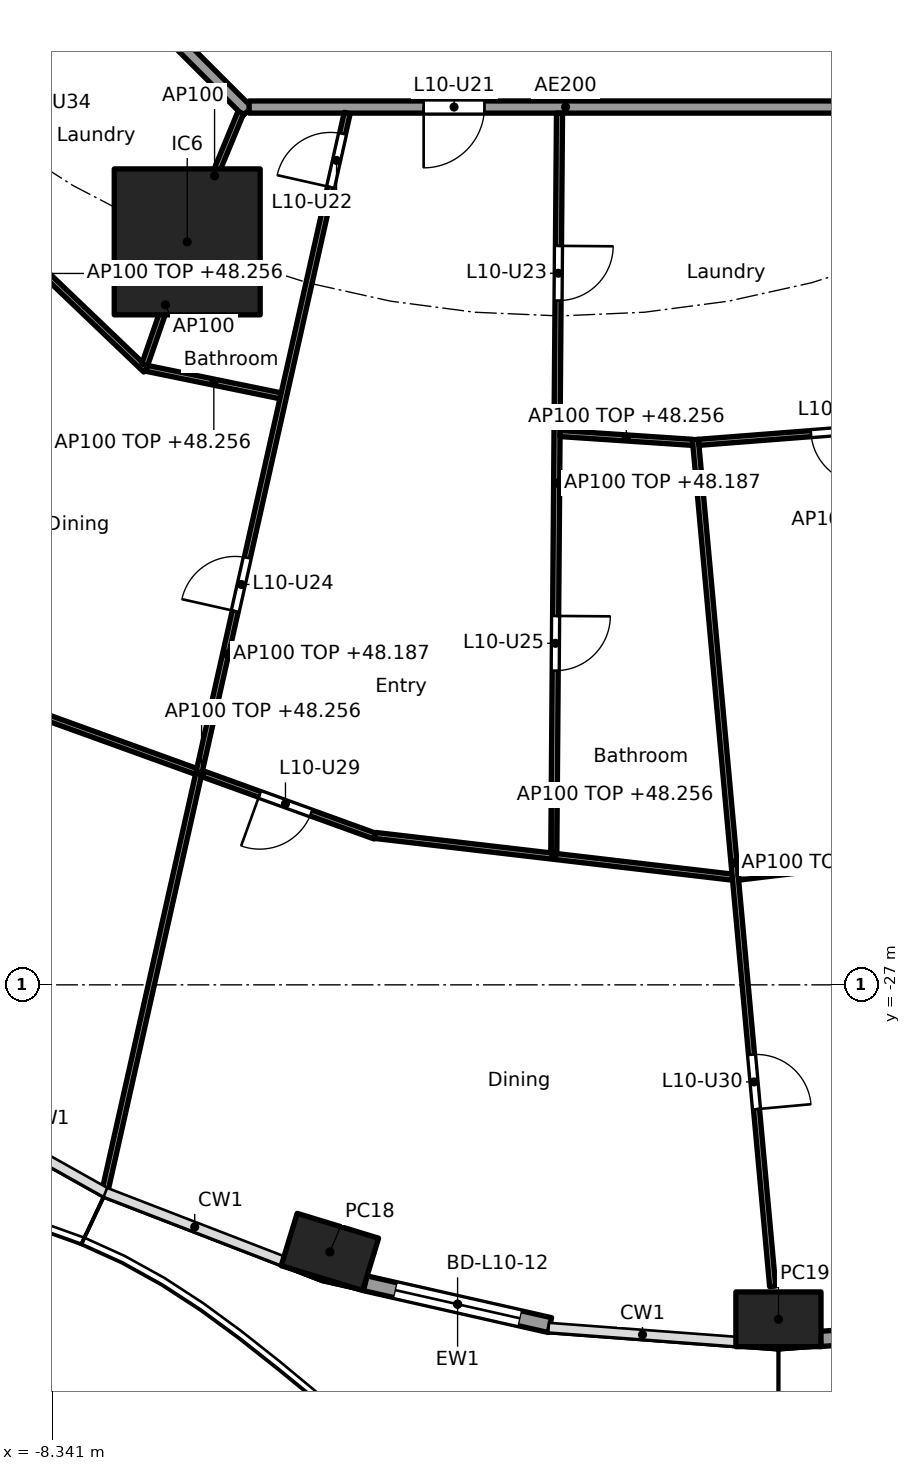
"""IFC4 building model, lengths in metres.
Left out: names, types, materials, properties, quantities, classifications, styles, units other than length and angle.
Written with IfcOpenShell. Run it as: python <this file> out.ifc"""

import sys

from ifc_helpers import new_model, si_unit, direction, frame, frame_2d, origin, origin_2d, place, context, subcontext, project, spatial, rectangle, hollow_rectangle, extrude, element, fill, save


model = new_model("IFC4")
c1 = context("Model", 3, precision=1e-05, world=origin(), true_north=direction((0.0, 1.0)))
c2 = subcontext(c1, "Body", "Model", "MODEL_VIEW")
j1 = project(units=[si_unit("LENGTHUNIT", "METRE"), si_unit("PLANEANGLEUNIT", "RADIAN")], contexts=[c1])
p1 = place(None, origin())
s1 = spatial("IfcSite", under=j1, at=p1, CompositionType="ELEMENT")
p2 = place(p1, origin())
s2 = spatial("IfcBuilding", under=s1, at=p2, CompositionType="ELEMENT")
p3 = place(p2, frame((0.0, 0.0, 45.5)))
s3 = spatial("IfcBuildingStorey", under=s2, at=p3, CompositionType="ELEMENT", Elevation=45.5)
for number, where, z_axis, x_axis in (
    (1, (-3.776, -31.393, 0.0), (0.0, 0.0, 1.0), (0.957, -0.292, 0.0)),
    (2, (3.6, -32.5, 0.0), (0.0, 0.0, 1.0), (1.0, 0.0, 0.0)),
):
    element("IfcColumn", number, at=place(p3, frame(where, z_axis=z_axis, x_axis=x_axis)), inside=s3, PredefinedType="COLUMN", context=c2, shape_type="SweptSolid", body=[
        extrude(hollow_rectangle(XDim=1.4, YDim=0.9, WallThickness=0.05, at=origin_2d()), origin(), (0.0, 0.0, 1.0), 3.7),
    ])
p4 = place(p3, frame((-6.123, -14.782, 0.0), z_axis=(0.0, 0.0, 1.0), x_axis=(1.0, 0.0, 0.0)))
e3 = element("IfcColumn", 3, at=p4, inside=s3, PredefinedType="COLUMN", context=c2, shape_type="SweptSolid", body=[
    extrude(rectangle(XDim=2.4, YDim=2.4, at=origin_2d()), origin(), (0.0, 0.0, 1.0), 3.7),
])
p5 = place(p3, frame((-0.158, -32.596, 0.0), z_axis=(0.0, 0.0, 1.0), x_axis=(-0.975331134677, 0.220746863466, 0.0)))
e4 = element("IfcWall", 4, at=p5, inside=s3, PredefinedType="SOLIDWALL", context=c2, shape_type="SweptSolid", body=[
    extrude(rectangle(XDim=3.115, YDim=0.25, at=frame_2d((1.557, 0.0))), origin(), (0.0, 0.0, 1.0), 3.44),
])
p6 = place(p5, frame((0.507, 0.0, 0.0)))
e5 = element("IfcOpeningElement", 5, at=p6, cuts=e4, PredefinedType="OPENING", context=c2, shape_type="SweptSolid", body=[
    extrude(rectangle(XDim=2.1, YDim=2.4, at=frame_2d((1.05, 1.2))), frame((0.0, 0.135, 0.0), z_axis=(0.0, -1.0, 0.0), x_axis=(1.0, 0.0, 0.0)), (0.0, 0.0, 1.0), 0.27),
])
p7 = place(p3, frame((7.376, -32.593, 0.0), z_axis=(0.0, 0.0, 1.0), x_axis=(-0.997230834878, -0.074368420505, 0.0)))
e6 = element("IfcWall", 6, at=p7, inside=s3, PredefinedType="SOLIDWALL", context=c2, shape_type="SweptSolid", body=[
    extrude(rectangle(XDim=3.096, YDim=0.25, at=frame_2d((1.548, 0.0))), origin(), (0.0, 0.0, 1.0), 3.44),
])
p8 = place(p7, frame((0.498, 0.0, 0.0)))
e7 = element("IfcOpeningElement", 7, at=p8, cuts=e6, PredefinedType="OPENING", context=c2, shape_type="SweptSolid", body=[
    extrude(rectangle(XDim=2.1, YDim=2.4, at=frame_2d((1.05, 1.2))), frame((0.0, 0.135, 0.0), z_axis=(0.0, -1.0, 0.0), x_axis=(1.0, 0.0, 0.0)), (0.0, 0.0, 1.0), 0.27),
])
p9 = place(p3, frame((-12.635, -5.134, 0.0), z_axis=(0.0, 0.0, 1.0), x_axis=(0.707106781187, -0.707106781187, 0.0)))
e8 = element("IfcWall", 8, at=p9, inside=s3, PredefinedType="PARTITIONING", context=c2, shape_type="SweptSolid", body=[
    extrude(rectangle(XDim=10.609, YDim=0.2, at=frame_2d((5.305, 0.0))), origin(), (0.0, 0.0, 1.0), 3.44),
])
p10 = place(p3, frame((-5.104, -12.565, 0.0), z_axis=(0.0, 0.0, 1.0), x_axis=(1.0, 0.0, 0.0)))
e9 = element("IfcWall", 9, at=p10, inside=s3, PredefinedType="PARTITIONING", context=c2, shape_type="SweptSolid", body=[
    extrude(rectangle(XDim=10.409, YDim=0.2, at=frame_2d((5.205, 0.0))), origin(), (0.0, 0.0, 1.0), 3.44),
])
p11 = place(p10, frame((2.87, 0.0, 0.0)))
e10 = element("IfcOpeningElement", 10, at=p11, cuts=e9, PredefinedType="OPENING", context=c2, shape_type="SweptSolid", body=[
    extrude(rectangle(XDim=1.0, YDim=2.1, at=frame_2d((0.5, 1.05))), frame((0.0, 0.11, 0.0), z_axis=(0.0, -1.0, 0.0), x_axis=(1.0, 0.0, 0.0)), (0.0, 0.0, 1.0), 0.22),
])
p12 = place(p3, frame((-7.715, -10.193, 0.0), z_axis=(0.0, 0.0, 1.0), x_axis=(-0.573126502256, -0.819466907454, 0.0)))
e11 = element("IfcWall", 11, at=p12, inside=s3, PredefinedType="PARTITIONING", context=c2, shape_type="SweptSolid", body=[
    extrude(rectangle(XDim=9.954, YDim=0.1, at=frame_2d((4.977, 0.0))), origin(), (0.0, 0.0, 1.0), 2.687),
])
p13 = place(p12, frame((6.631, 0.0, 0.0)))
e12 = element("IfcOpeningElement", 12, at=p13, cuts=e11, PredefinedType="OPENING", context=c2, shape_type="SweptSolid", body=[
    extrude(rectangle(XDim=0.9, YDim=2.1, at=frame_2d((0.45, 1.05))), frame((0.0, 0.06, 0.0), z_axis=(0.0, -1.0, 0.0), x_axis=(1.0, 0.0, 0.0)), (0.0, 0.0, 1.0), 0.12),
])
p14 = place(p12, frame((1.678, 0.0, 0.0)))
e13 = element("IfcOpeningElement", 13, at=p14, cuts=e11, PredefinedType="OPENING", context=c2, shape_type="SweptSolid", body=[
    extrude(rectangle(XDim=0.9, YDim=2.1, at=frame_2d((0.45, 1.05))), frame((0.0, 0.06, 0.0), z_axis=(0.0, -1.0, 0.0), x_axis=(1.0, 0.0, 0.0)), (0.0, 0.0, 1.0), 0.12),
])
p15 = place(p3, frame((-10.119, -13.716, 0.0), z_axis=(0.0, 0.0, 1.0), x_axis=(0.722763212502, -0.69109575216, 0.0)))
e14 = element("IfcWall", 14, at=p15, inside=s3, PredefinedType="PARTITIONING", context=c2, shape_type="SweptSolid", body=[
    extrude(rectangle(XDim=4.587, YDim=0.1, at=frame_2d((2.293, 0.0))), origin(), (0.0, 0.0, 1.0), 2.756),
])
p16 = place(p15, frame((0.938, 0.0, 0.0)))
e15 = element("IfcOpeningElement", 15, at=p16, cuts=e14, PredefinedType="OPENING", context=c2, shape_type="SweptSolid", body=[
    extrude(rectangle(XDim=0.9, YDim=2.1, at=frame_2d((0.45, 1.05))), frame((0.0, 0.06, 0.0), z_axis=(0.0, -1.0, 0.0), x_axis=(1.0, 0.0, 0.0)), (0.0, 0.0, 1.0), 0.12),
])
p17 = place(p3, frame((-5.243, -12.657, 0.0), z_axis=(0.0, 0.0, 1.0), x_axis=(-0.382719158442, -0.923864733477, 0.0)))
e16 = element("IfcWall", 16, at=p17, inside=s3, PredefinedType="PARTITIONING", context=c2, shape_type="SweptSolid", body=[
    extrude(rectangle(XDim=2.25, YDim=0.1, at=frame_2d((1.125, 0.0))), origin(), (0.0, 0.0, 1.0), 3.44),
])
p18 = place(p3, frame((-6.139, -14.83, 0.0), z_axis=(0.0, 0.0, 1.0), x_axis=(-0.327246993321, -0.944938836837, 0.0)))
e17 = element("IfcWall", 17, at=p18, inside=s3, PredefinedType="PARTITIONING", context=c2, shape_type="SweptSolid", body=[
    extrude(rectangle(XDim=2.09, YDim=0.1, at=frame_2d((1.045, 0.0))), origin(), (0.0, 0.0, 1.0), 3.44),
])
p19 = place(p3, frame((-6.791, -16.862, 0.0), z_axis=(0.0, 0.0, 1.0), x_axis=(0.979581941859, -0.201045316246, 0.0)))
e18 = element("IfcWall", 18, at=p19, inside=s3, PredefinedType="PARTITIONING", context=c2, shape_type="SweptSolid", body=[
    extrude(rectangle(XDim=2.256, YDim=0.1, at=frame_2d((1.128, 0.0))), origin(), (0.0, 0.0, 1.0), 2.756),
])
p20 = place(p3, frame((-8.739, -22.491, 0.0), z_axis=(0.0, 0.0, 1.0), x_axis=(0.940401691072, -0.340065669288, 0.0)))
e19 = element("IfcWall", 19, at=p20, inside=s3, PredefinedType="PARTITIONING", context=c2, shape_type="SweptSolid", body=[
    extrude(rectangle(XDim=6.067, YDim=0.1, at=frame_2d((3.034, 0.0))), origin(), (0.0, 0.0, 1.0), 2.756),
])
p21 = place(p20, frame((4.05, 0.0, 0.0)))
e20 = element("IfcOpeningElement", 20, at=p21, cuts=e19, PredefinedType="OPENING", context=c2, shape_type="SweptSolid", body=[
    extrude(rectangle(XDim=0.9, YDim=2.1, at=frame_2d((0.45, 1.05))), frame((0.0, 0.06, 0.0), z_axis=(0.0, -1.0, 0.0), x_axis=(1.0, 0.0, 0.0)), (0.0, 0.0, 1.0), 0.12),
])
p22 = place(p3, frame((-3.492, -12.662, 0.0), z_axis=(0.0, 0.0, 1.0), x_axis=(-0.219268088006, -0.975664648115, 0.0)))
e21 = element("IfcWall", 21, at=p22, inside=s3, PredefinedType="PARTITIONING", context=c2, shape_type="SweptSolid", body=[
    extrude(rectangle(XDim=18.23, YDim=0.1, at=frame_2d((9.115, 0.0))), origin(), (0.0, 0.0, 1.0), 2.687),
])
p23 = place(p22, frame((0.35, 0.0, 0.0)))
e22 = element("IfcOpeningElement", 22, at=p23, cuts=e21, PredefinedType="OPENING", context=c2, shape_type="SweptSolid", body=[
    extrude(rectangle(XDim=0.9, YDim=2.1, at=frame_2d((0.45, 1.05))), frame((0.0, 0.06, 0.0), z_axis=(0.0, -1.0, 0.0), x_axis=(1.0, 0.0, 0.0)), (0.0, 0.0, 1.0), 0.12),
])
p24 = place(p22, frame((7.497, 0.0, 0.0)))
e23 = element("IfcOpeningElement", 23, at=p24, cuts=e21, PredefinedType="OPENING", context=c2, shape_type="SweptSolid", body=[
    extrude(rectangle(XDim=0.9, YDim=2.1, at=frame_2d((0.45, 1.05))), frame((0.0, 0.06, 0.0), z_axis=(0.0, -1.0, 0.0), x_axis=(1.0, 0.0, 0.0)), (0.0, 0.0, 1.0), 0.12),
])
p25 = place(p3, frame((-3.031, -24.543, 0.0), z_axis=(0.0, 0.0, 1.0), x_axis=(0.993255612046, -0.115945198862, 0.0)))
e24 = element("IfcWall", 24, at=p25, inside=s3, PredefinedType="PARTITIONING", context=c2, shape_type="SweptSolid", body=[
    extrude(rectangle(XDim=5.913, YDim=0.1, at=frame_2d((2.956, 0.0))), origin(), (0.0, 0.0, 1.0), 2.756),
])
p26 = place(p3, frame((-0.001, -12.665, 0.0), z_axis=(0.0, 0.0, 1.0), x_axis=(-0.007702417287, -0.999970335944, 0.0)))
e25 = element("IfcWall", 25, at=p26, inside=s3, PredefinedType="PARTITIONING", context=c2, shape_type="SweptSolid", body=[
    extrude(rectangle(XDim=12.171, YDim=0.1, at=frame_2d((6.086, 0.0))), origin(), (0.0, 0.0, 1.0), 2.687),
])
p27 = place(p26, frame((2.183, 0.0, 0.0)))
e26 = element("IfcOpeningElement", 26, at=p27, cuts=e25, PredefinedType="OPENING", context=c2, shape_type="SweptSolid", body=[
    extrude(rectangle(XDim=0.9, YDim=2.1, at=frame_2d((0.45, 1.05))), frame((0.0, 0.06, 0.0), z_axis=(0.0, -1.0, 0.0), x_axis=(1.0, 0.0, 0.0)), (0.0, 0.0, 1.0), 0.12),
])
p28 = place(p26, frame((8.269, 0.0, 0.0)))
e27 = element("IfcOpeningElement", 27, at=p28, cuts=e25, PredefinedType="OPENING", context=c2, shape_type="SweptSolid", body=[
    extrude(rectangle(XDim=0.9, YDim=2.1, at=frame_2d((0.45, 1.05))), frame((0.0, 0.06, 0.0), z_axis=(0.0, -1.0, 0.0), x_axis=(1.0, 0.0, 0.0)), (0.0, 0.0, 1.0), 0.12),
])
p29 = place(p3, frame((0.009, -17.934, 0.0), z_axis=(0.0, 0.0, 1.0), x_axis=(0.997794542617, -0.066378089183, 0.0)))
e28 = element("IfcWall", 28, at=p29, inside=s3, PredefinedType="PARTITIONING", context=c2, shape_type="SweptSolid", body=[
    extrude(rectangle(XDim=2.185, YDim=0.1, at=frame_2d((1.092, 0.0))), origin(), (0.0, 0.0, 1.0), 2.756),
])
p30 = place(p3, frame((2.234, -18.032, 0.0), z_axis=(0.0, 0.0, 1.0), x_axis=(0.090891502968, -0.995860800859, 0.0)))
e29 = element("IfcWall", 29, at=p30, inside=s3, PredefinedType="PARTITIONING", context=c2, shape_type="SweptSolid", body=[
    extrude(rectangle(XDim=13.984, YDim=0.1, at=frame_2d((6.992, 0.0))), origin(), (0.0, 0.0, 1.0), 2.756),
])
p31 = place(p30, frame((10.158, 0.0, 0.0)))
e30 = element("IfcOpeningElement", 30, at=p31, cuts=e29, PredefinedType="OPENING", context=c2, shape_type="SweptSolid", body=[
    extrude(rectangle(XDim=0.9, YDim=2.1, at=frame_2d((0.45, 1.05))), frame((0.0, 0.06, 0.0), z_axis=(0.0, -1.0, 0.0), x_axis=(1.0, 0.0, 0.0)), (0.0, 0.0, 1.0), 0.12),
])
p32 = place(p3, frame((2.288, -18.078, 0.0), z_axis=(0.0, 0.0, 1.0), x_axis=(0.99701850123, 0.077162868047, 0.0)))
e31 = element("IfcWall", 31, at=p32, inside=s3, PredefinedType="PARTITIONING", context=c2, shape_type="SweptSolid", body=[
    extrude(rectangle(XDim=4.604, YDim=0.1, at=frame_2d((2.302, 0.0))), origin(), (0.0, 0.0, 1.0), 2.756),
])
p33 = place(p32, frame((1.852, 0.0, 0.0)))
e32 = element("IfcOpeningElement", 32, at=p33, cuts=e31, PredefinedType="OPENING", context=c2, shape_type="SweptSolid", body=[
    extrude(rectangle(XDim=0.9, YDim=2.1, at=frame_2d((0.45, 1.05))), frame((0.0, 0.06, 0.0), z_axis=(0.0, -1.0, 0.0), x_axis=(1.0, 0.0, 0.0)), (0.0, 0.0, 1.0), 0.12),
])
p34 = place(p3, frame((2.941, -25.229, 0.0), z_axis=(0.0, 0.0, 1.0), x_axis=(0.992834127896, 0.119500604542, 0.0)))
e33 = element("IfcWall", 33, at=p34, inside=s3, PredefinedType="PARTITIONING", context=c2, shape_type="SweptSolid", body=[
    extrude(rectangle(XDim=5.959, YDim=0.1, at=frame_2d((2.98, 0.0))), origin(), (0.0, 0.0, 1.0), 2.756),
])
p35 = place(p6, origin())
e34 = element("IfcDoor", 34, at=p35, inside=s3, OperationType="SLIDING_TO_LEFT", PredefinedType="DOOR", context=c2, shape_type="SweptSolid", body=[
    extrude(rectangle(XDim=2.1, YDim=2.4, at=frame_2d((1.05, 1.2))), frame((0.0, 0.025, 0.0), z_axis=(0.0, -1.0, 0.0), x_axis=(1.0, 0.0, 0.0)), (0.0, 0.0, 1.0), 0.05),
])
fill(e5, e34)
p36 = place(p11, frame((1.0, 0.0, 0.0), x_axis=(-1.0, 0.0, 0.0)))
e35 = element("IfcDoor", 35, at=p36, inside=s3, OperationType="SINGLE_SWING_RIGHT", PredefinedType="DOOR", context=c2, shape_type="SweptSolid", body=[
    extrude(rectangle(XDim=1.0, YDim=2.1, at=frame_2d((0.5, 1.05))), frame((0.0, 0.025, 0.0), z_axis=(0.0, -1.0, 0.0), x_axis=(1.0, 0.0, 0.0)), (0.0, 0.0, 1.0), 0.05),
])
fill(e10, e35)
p37 = place(p23, frame((0.9, 0.0, 0.0), x_axis=(-1.0, 0.0, 0.0)))
e36 = element("IfcDoor", 36, at=p37, inside=s3, OperationType="SINGLE_SWING_LEFT", PredefinedType="DOOR", context=c2, shape_type="SweptSolid", body=[
    extrude(rectangle(XDim=0.9, YDim=2.1, at=frame_2d((0.45, 1.05))), frame((0.0, 0.025, 0.0), z_axis=(0.0, -1.0, 0.0), x_axis=(1.0, 0.0, 0.0)), (0.0, 0.0, 1.0), 0.05),
])
fill(e22, e36)
p38 = place(p27, origin())
e37 = element("IfcDoor", 37, at=p38, inside=s3, OperationType="SINGLE_SWING_LEFT", PredefinedType="DOOR", context=c2, shape_type="SweptSolid", body=[
    extrude(rectangle(XDim=0.9, YDim=2.1, at=frame_2d((0.45, 1.05))), frame((0.0, 0.025, 0.0), z_axis=(0.0, -1.0, 0.0), x_axis=(1.0, 0.0, 0.0)), (0.0, 0.0, 1.0), 0.05),
])
fill(e26, e37)
p39 = place(p24, frame((0.9, 0.0, 0.0), x_axis=(-1.0, 0.0, 0.0)))
e38 = element("IfcDoor", 38, at=p39, inside=s3, OperationType="SINGLE_SWING_LEFT", PredefinedType="DOOR", context=c2, shape_type="SweptSolid", body=[
    extrude(rectangle(XDim=0.9, YDim=2.1, at=frame_2d((0.45, 1.05))), frame((0.0, 0.025, 0.0), z_axis=(0.0, -1.0, 0.0), x_axis=(1.0, 0.0, 0.0)), (0.0, 0.0, 1.0), 0.05),
])
fill(e23, e38)
p40 = place(p28, origin())
e39 = element("IfcDoor", 39, at=p40, inside=s3, OperationType="SINGLE_SWING_LEFT", PredefinedType="DOOR", context=c2, shape_type="SweptSolid", body=[
    extrude(rectangle(XDim=0.9, YDim=2.1, at=frame_2d((0.45, 1.05))), frame((0.0, 0.025, 0.0), z_axis=(0.0, -1.0, 0.0), x_axis=(1.0, 0.0, 0.0)), (0.0, 0.0, 1.0), 0.05),
])
fill(e27, e39)
p41 = place(p33, frame((0.9, 0.0, 0.0), x_axis=(-1.0, 0.0, 0.0)))
e40 = element("IfcDoor", 40, at=p41, inside=s3, OperationType="SINGLE_SWING_LEFT", PredefinedType="DOOR", context=c2, shape_type="SweptSolid", body=[
    extrude(rectangle(XDim=0.9, YDim=2.1, at=frame_2d((0.45, 1.05))), frame((0.0, 0.025, 0.0), z_axis=(0.0, -1.0, 0.0), x_axis=(1.0, 0.0, 0.0)), (0.0, 0.0, 1.0), 0.05),
])
fill(e32, e40)
p42 = place(p21, frame((0.9, 0.0, 0.0), x_axis=(-1.0, 0.0, 0.0)))
e41 = element("IfcDoor", 41, at=p42, inside=s3, OperationType="SINGLE_SWING_RIGHT", PredefinedType="DOOR", context=c2, shape_type="SweptSolid", body=[
    extrude(rectangle(XDim=0.9, YDim=2.1, at=frame_2d((0.45, 1.05))), frame((0.0, 0.025, 0.0), z_axis=(0.0, -1.0, 0.0), x_axis=(1.0, 0.0, 0.0)), (0.0, 0.0, 1.0), 0.05),
])
fill(e20, e41)
p43 = place(p31, origin())
e42 = element("IfcDoor", 42, at=p43, inside=s3, OperationType="SINGLE_SWING_RIGHT", PredefinedType="DOOR", context=c2, shape_type="SweptSolid", body=[
    extrude(rectangle(XDim=0.9, YDim=2.1, at=frame_2d((0.45, 1.05))), frame((0.0, 0.025, 0.0), z_axis=(0.0, -1.0, 0.0), x_axis=(1.0, 0.0, 0.0)), (0.0, 0.0, 1.0), 0.05),
])
fill(e30, e42)
save(model, sys.argv[1])
